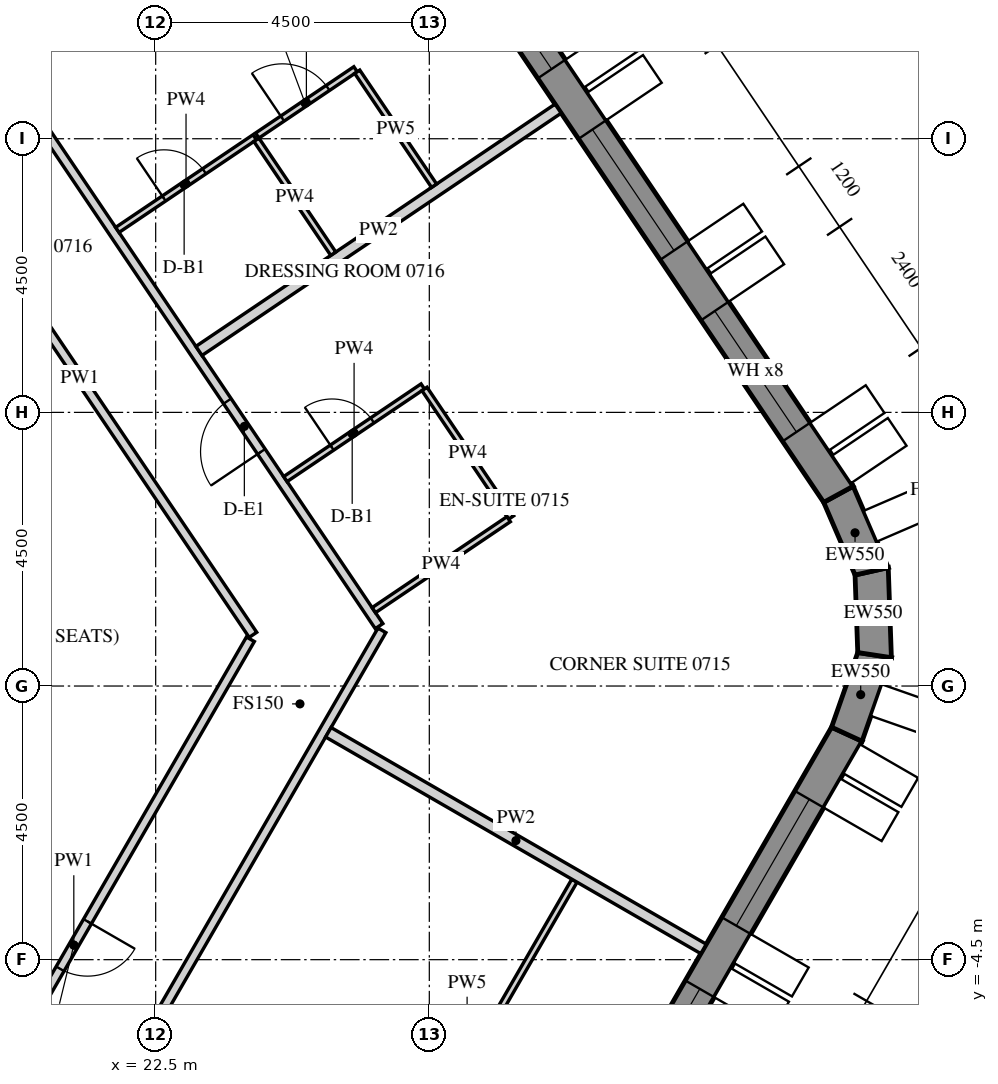
"""IFC4 building model, lengths in metres.
Left out: names, types, materials, properties, quantities, classifications, styles, units other than length and angle.
Written with IfcOpenShell. Run it as: python <this file> out.ifc"""

import sys

from ifc_helpers import new_model, si_unit, direction, frame, frame_2d, origin, place, context, subcontext, project, spatial, polyline, rectangle, outline, extrude, element, fill, save


model = new_model("IFC4")
c1 = context("Model", 3, precision=1e-05, world=origin(), true_north=direction((0.0, 1.0)))
c2 = subcontext(c1, "Body", "Model", "MODEL_VIEW")
j1 = project(units=[si_unit("LENGTHUNIT", "METRE"), si_unit("PLANEANGLEUNIT", "RADIAN")], contexts=[c1])
p1 = place(None, origin())
s1 = spatial("IfcSite", under=j1, at=p1, CompositionType="ELEMENT")
p2 = place(p1, origin())
s2 = spatial("IfcBuilding", under=s1, at=p2, CompositionType="ELEMENT")
p3 = place(p2, frame((0.0, 0.0, 99.9)))
s3 = spatial("IfcBuildingStorey", under=s2, at=p3, CompositionType="ELEMENT", Elevation=99.9)
p4 = place(p3, frame((18.83, -26.835, -0.15), z_axis=(0.0, 0.0, 1.0), x_axis=(0.500003800416, 0.866023209602, 0.0)))
e1 = element("IfcWall", 1, at=p4, inside=s3, PredefinedType="SOLIDWALL", context=c2, shape_type="SweptSolid", body=[
    extrude(outline(polyline([(-0.022, -0.275), (30.097, -0.275), (30.045, 0.275), (0.022, 0.275), (-0.022, -0.275)])), origin(), (0.0, 0.0, 1.0), 3.9),
])
p5 = place(p4, frame((1.236, 0.0, 1.05)))
e2 = element("IfcOpeningElement", 2, at=p5, cuts=e1, PredefinedType="OPENING", context=c2, shape_type="SweptSolid", body=[
    extrude(rectangle(XDim=2.4, YDim=2.4, at=frame_2d((1.2, 1.2))), frame((0.0, 0.285, 0.0), z_axis=(0.0, -1.0, 0.0), x_axis=(1.0, 0.0, 0.0)), (0.0, 0.0, 1.0), 0.57),
])
p6 = place(p4, frame((4.835, 0.0, 1.05)))
e3 = element("IfcOpeningElement", 3, at=p6, cuts=e1, PredefinedType="OPENING", context=c2, shape_type="SweptSolid", body=[
    extrude(rectangle(XDim=2.4, YDim=2.4, at=frame_2d((1.2, 1.2))), frame((0.0, 0.285, 0.0), z_axis=(0.0, -1.0, 0.0), x_axis=(1.0, 0.0, 0.0)), (0.0, 0.0, 1.0), 0.57),
])
p7 = place(p4, frame((8.436, 0.0, 1.05)))
e4 = element("IfcOpeningElement", 4, at=p7, cuts=e1, PredefinedType="OPENING", context=c2, shape_type="SweptSolid", body=[
    extrude(rectangle(XDim=2.4, YDim=2.4, at=frame_2d((1.2, 1.2))), frame((0.0, 0.285, 0.0), z_axis=(0.0, -1.0, 0.0), x_axis=(1.0, 0.0, 0.0)), (0.0, 0.0, 1.0), 0.57),
])
p8 = place(p4, frame((12.035, 0.0, 1.05)))
e5 = element("IfcOpeningElement", 5, at=p8, cuts=e1, PredefinedType="OPENING", context=c2, shape_type="SweptSolid", body=[
    extrude(rectangle(XDim=2.4, YDim=2.4, at=frame_2d((1.2, 1.2))), frame((0.0, 0.285, 0.0), z_axis=(0.0, -1.0, 0.0), x_axis=(1.0, 0.0, 0.0)), (0.0, 0.0, 1.0), 0.57),
])
p9 = place(p4, frame((15.635, 0.0, 1.05)))
e6 = element("IfcOpeningElement", 6, at=p9, cuts=e1, PredefinedType="OPENING", context=c2, shape_type="SweptSolid", body=[
    extrude(rectangle(XDim=2.4, YDim=2.4, at=frame_2d((1.2, 1.2))), frame((0.0, 0.285, 0.0), z_axis=(0.0, -1.0, 0.0), x_axis=(1.0, 0.0, 0.0)), (0.0, 0.0, 1.0), 0.57),
])
p10 = place(p4, frame((19.236, 0.0, 1.05)))
e7 = element("IfcOpeningElement", 7, at=p10, cuts=e1, PredefinedType="OPENING", context=c2, shape_type="SweptSolid", body=[
    extrude(rectangle(XDim=2.4, YDim=2.4, at=frame_2d((1.2, 1.2))), frame((0.0, 0.285, 0.0), z_axis=(0.0, -1.0, 0.0), x_axis=(1.0, 0.0, 0.0)), (0.0, 0.0, 1.0), 0.57),
])
p11 = place(p4, frame((22.835, 0.0, 1.05)))
e8 = element("IfcOpeningElement", 8, at=p11, cuts=e1, PredefinedType="OPENING", context=c2, shape_type="SweptSolid", body=[
    extrude(rectangle(XDim=2.4, YDim=2.4, at=frame_2d((1.2, 1.2))), frame((0.0, 0.285, 0.0), z_axis=(0.0, -1.0, 0.0), x_axis=(1.0, 0.0, 0.0)), (0.0, 0.0, 1.0), 0.57),
])
p12 = place(p4, frame((26.436, 0.0, 1.05)))
e9 = element("IfcOpeningElement", 9, at=p12, cuts=e1, PredefinedType="OPENING", context=c2, shape_type="SweptSolid", body=[
    extrude(rectangle(XDim=2.4, YDim=2.4, at=frame_2d((1.2, 1.2))), frame((0.0, 0.285, 0.0), z_axis=(0.0, -1.0, 0.0), x_axis=(1.0, 0.0, 0.0)), (0.0, 0.0, 1.0), 0.57),
])
p13 = place(p3, frame((33.866, -0.792, -0.15), z_axis=(0.0, 0.0, 1.0), x_axis=(0.33111537203, 0.943590276765, 0.0)))
e10 = element("IfcWall", 10, at=p13, inside=s3, PredefinedType="SOLIDWALL", context=c2, shape_type="SweptSolid", body=[
    extrude(outline(polyline([(-0.026, -0.275), (1.431, -0.275), (1.327, 0.275), (0.026, 0.275), (-0.026, -0.275)])), origin(), (0.0, 0.0, 1.0), 3.9),
])
p14 = place(p3, frame((34.323, 0.509, -0.15), z_axis=(0.0, 0.0, 1.0), x_axis=(-0.034876908462, 0.999391615562, 0.0)))
e11 = element("IfcWall", 11, at=p14, inside=s3, PredefinedType="SOLIDWALL", context=c2, shape_type="SweptSolid", body=[
    extrude(outline(polyline([(-0.052, -0.275), (1.431, -0.275), (1.327, 0.275), (0.052, 0.275), (-0.052, -0.275)])), origin(), (0.0, 0.0, 1.0), 3.9),
])
p15 = place(p3, frame((34.274, 1.887, -0.15), z_axis=(0.0, 0.0, 1.0), x_axis=(-0.396161342798, 0.918180913803, 0.0)))
e12 = element("IfcWall", 12, at=p15, inside=s3, PredefinedType="SOLIDWALL", context=c2, shape_type="SweptSolid", body=[
    extrude(outline(polyline([(-0.052, -0.275), (1.405, -0.275), (1.354, 0.275), (0.052, 0.275), (-0.052, -0.275)])), origin(), (0.0, 0.0, 1.0), 3.9),
])
p16 = place(p3, frame((33.728, 3.153, -0.15), z_axis=(0.0, 0.0, 1.0), x_axis=(-0.559192411416, 0.82903790445, 0.0)))
e13 = element("IfcWall", 13, at=p16, inside=s3, PredefinedType="SOLIDWALL", context=c2, shape_type="SweptSolid", body=[
    extrude(outline(polyline([(-0.026, -0.275), (30.093, -0.275), (30.048, 0.275), (0.026, 0.275), (-0.026, -0.275)])), origin(), (0.0, 0.0, 1.0), 3.9),
])
p17 = place(p16, frame((1.236, 0.0, 1.05)))
e14 = element("IfcOpeningElement", 14, at=p17, cuts=e13, PredefinedType="OPENING", context=c2, shape_type="SweptSolid", body=[
    extrude(rectangle(XDim=2.4, YDim=2.4, at=frame_2d((1.2, 1.2))), frame((0.0, 0.285, 0.0), z_axis=(0.0, -1.0, 0.0), x_axis=(1.0, 0.0, 0.0)), (0.0, 0.0, 1.0), 0.57),
])
p18 = place(p16, frame((4.835, 0.0, 1.05)))
e15 = element("IfcOpeningElement", 15, at=p18, cuts=e13, PredefinedType="OPENING", context=c2, shape_type="SweptSolid", body=[
    extrude(rectangle(XDim=2.4, YDim=2.4, at=frame_2d((1.2, 1.2))), frame((0.0, 0.285, 0.0), z_axis=(0.0, -1.0, 0.0), x_axis=(1.0, 0.0, 0.0)), (0.0, 0.0, 1.0), 0.57),
])
p19 = place(p16, frame((8.436, 0.0, 1.05)))
e16 = element("IfcOpeningElement", 16, at=p19, cuts=e13, PredefinedType="OPENING", context=c2, shape_type="SweptSolid", body=[
    extrude(rectangle(XDim=2.4, YDim=2.4, at=frame_2d((1.2, 1.2))), frame((0.0, 0.285, 0.0), z_axis=(0.0, -1.0, 0.0), x_axis=(1.0, 0.0, 0.0)), (0.0, 0.0, 1.0), 0.57),
])
p20 = place(p16, frame((12.035, 0.0, 1.05)))
e17 = element("IfcOpeningElement", 17, at=p20, cuts=e13, PredefinedType="OPENING", context=c2, shape_type="SweptSolid", body=[
    extrude(rectangle(XDim=2.4, YDim=2.4, at=frame_2d((1.2, 1.2))), frame((0.0, 0.285, 0.0), z_axis=(0.0, -1.0, 0.0), x_axis=(1.0, 0.0, 0.0)), (0.0, 0.0, 1.0), 0.57),
])
p21 = place(p16, frame((15.635, 0.0, 1.05)))
e18 = element("IfcOpeningElement", 18, at=p21, cuts=e13, PredefinedType="OPENING", context=c2, shape_type="SweptSolid", body=[
    extrude(rectangle(XDim=2.4, YDim=2.4, at=frame_2d((1.2, 1.2))), frame((0.0, 0.285, 0.0), z_axis=(0.0, -1.0, 0.0), x_axis=(1.0, 0.0, 0.0)), (0.0, 0.0, 1.0), 0.57),
])
p22 = place(p16, frame((19.236, 0.0, 1.05)))
e19 = element("IfcOpeningElement", 19, at=p22, cuts=e13, PredefinedType="OPENING", context=c2, shape_type="SweptSolid", body=[
    extrude(rectangle(XDim=2.4, YDim=2.4, at=frame_2d((1.2, 1.2))), frame((0.0, 0.285, 0.0), z_axis=(0.0, -1.0, 0.0), x_axis=(1.0, 0.0, 0.0)), (0.0, 0.0, 1.0), 0.57),
])
p23 = place(p16, frame((22.835, 0.0, 1.05)))
e20 = element("IfcOpeningElement", 20, at=p23, cuts=e13, PredefinedType="OPENING", context=c2, shape_type="SweptSolid", body=[
    extrude(rectangle(XDim=2.4, YDim=2.4, at=frame_2d((1.2, 1.2))), frame((0.0, 0.285, 0.0), z_axis=(0.0, -1.0, 0.0), x_axis=(1.0, 0.0, 0.0)), (0.0, 0.0, 1.0), 0.57),
])
p24 = place(p16, frame((26.436, 0.0, 1.05)))
e21 = element("IfcOpeningElement", 21, at=p24, cuts=e13, PredefinedType="OPENING", context=c2, shape_type="SweptSolid", body=[
    extrude(rectangle(XDim=2.4, YDim=2.4, at=frame_2d((1.2, 1.2))), frame((0.0, 0.285, 0.0), z_axis=(0.0, -1.0, 0.0), x_axis=(1.0, 0.0, 0.0)), (0.0, 0.0, 1.0), 0.57),
])
p25 = place(p3, frame((14.102, -20.075, 0.0), z_axis=(0.0, 0.0, 1.0), x_axis=(0.499996816197, 0.866027241946, 0.0)))
e22 = element("IfcWall", 22, at=p25, inside=s3, PredefinedType="PARTITIONING", context=c2, shape_type="SweptSolid", body=[
    extrude(rectangle(XDim=24.238, YDim=0.15, at=frame_2d((12.119, 0.0))), origin(), (0.0, 0.0, 1.0), 2.988),
])
p26 = place(p25, frame((4.729, 0.0, 0.0)))
e23 = element("IfcOpeningElement", 23, at=p26, cuts=e22, PredefinedType="OPENING", context=c2, shape_type="SweptSolid", body=[
    extrude(rectangle(XDim=1.0, YDim=2.1, at=frame_2d((0.5, 1.05))), frame((0.0, 0.085, 0.0), z_axis=(0.0, -1.0, 0.0), x_axis=(1.0, 0.0, 0.0)), (0.0, 0.0, 1.0), 0.17),
])
p27 = place(p25, frame((15.946, 0.0, 0.0)))
e24 = element("IfcOpeningElement", 24, at=p27, cuts=e22, PredefinedType="OPENING", context=c2, shape_type="SweptSolid", body=[
    extrude(rectangle(XDim=1.0, YDim=2.1, at=frame_2d((0.5, 1.05))), frame((0.0, 0.085, 0.0), z_axis=(0.0, -1.0, 0.0), x_axis=(1.0, 0.0, 0.0)), (0.0, 0.0, 1.0), 0.17),
])
p28 = place(p3, frame((26.174, 0.985, 0.0), z_axis=(0.0, 0.0, 1.0), x_axis=(-0.559192163771, 0.829038071488, 0.0)))
e25 = element("IfcWall", 25, at=p28, inside=s3, PredefinedType="PARTITIONING", context=c2, shape_type="SweptSolid", body=[
    extrude(rectangle(XDim=22.335, YDim=0.15, at=frame_2d((11.168, 0.0))), origin(), (0.0, 0.0, 1.0), 2.988),
])
p29 = place(p28, frame((3.463, 0.0, 0.0)))
e26 = element("IfcOpeningElement", 26, at=p29, cuts=e25, PredefinedType="OPENING", context=c2, shape_type="SweptSolid", body=[
    extrude(rectangle(XDim=1.0, YDim=2.1, at=frame_2d((0.5, 1.05))), frame((0.0, 0.085, 0.0), z_axis=(0.0, -1.0, 0.0), x_axis=(1.0, 0.0, 0.0)), (0.0, 0.0, 1.0), 0.17),
])
p30 = place(p28, frame((13.309, 0.0, 0.0)))
e27 = element("IfcOpeningElement", 27, at=p30, cuts=e25, PredefinedType="OPENING", context=c2, shape_type="SweptSolid", body=[
    extrude(rectangle(XDim=1.0, YDim=2.1, at=frame_2d((0.5, 1.05))), frame((0.0, 0.085, 0.0), z_axis=(0.0, -1.0, 0.0), x_axis=(1.0, 0.0, 0.0)), (0.0, 0.0, 1.0), 0.17),
])
p31 = place(p3, frame((18.4, 9.291, 0.0), z_axis=(0.0, 0.0, 1.0), x_axis=(0.559191829043, -0.829038297265, 0.0)))
e28 = element("IfcWall", 28, at=p31, inside=s3, PredefinedType="PARTITIONING", context=c2, shape_type="SweptSolid", body=[
    extrude(rectangle(XDim=10.192, YDim=0.15, at=frame_2d((5.096, 0.0))), origin(), (0.0, 0.0, 1.0), 2.988),
])
p32 = place(p3, frame((24.058, 0.769, 0.0), z_axis=(0.0, 0.0, 1.0), x_axis=(-0.499995346943, -0.866028090212, 0.0)))
e29 = element("IfcWall", 29, at=p32, inside=s3, PredefinedType="PARTITIONING", context=c2, shape_type="SweptSolid", body=[
    extrude(rectangle(XDim=11.616, YDim=0.15, at=frame_2d((5.808, 0.0))), origin(), (0.0, 0.0, 1.0), 2.988),
])
p33 = place(p32, frame((5.358, 0.0, 0.0)))
e30 = element("IfcOpeningElement", 30, at=p33, cuts=e29, PredefinedType="OPENING", context=c2, shape_type="SweptSolid", body=[
    extrude(rectangle(XDim=0.9, YDim=2.1, at=frame_2d((0.45, 1.05))), frame((0.0, 0.085, 0.0), z_axis=(0.0, -1.0, 0.0), x_axis=(1.0, 0.0, 0.0)), (0.0, 0.0, 1.0), 0.17),
])
p34 = place(p3, frame((25.856, -9.315, 0.0), z_axis=(0.0, 0.0, 1.0), x_axis=(0.500010820671, 0.866019156377, 0.0)))
e31 = element("IfcWall", 31, at=p34, inside=s3, PredefinedType="PARTITIONING", context=c2, shape_type="SweptSolid", body=[
    extrude(rectangle(XDim=7.06, YDim=0.1, at=frame_2d((3.53, 0.0))), origin(), (0.0, 0.0, 1.0), 2.988),
])
p35 = place(p34, frame((3.1, 0.0, 0.0)))
e32 = element("IfcOpeningElement", 32, at=p35, cuts=e31, PredefinedType="OPENING", context=c2, shape_type="SweptSolid", body=[
    extrude(rectangle(XDim=0.9, YDim=2.1, at=frame_2d((0.45, 1.05))), frame((0.0, 0.06, 0.0), z_axis=(0.0, -1.0, 0.0), x_axis=(1.0, 0.0, 0.0)), (0.0, 0.0, 1.0), 0.12),
])
p36 = place(p3, frame((31.51, -4.323, 0.0), z_axis=(0.0, 0.0, 1.0), x_axis=(-0.866009834831, 0.500026965249, 0.0)))
e33 = element("IfcWall", 33, at=p36, inside=s3, PredefinedType="PARTITIONING", context=c2, shape_type="SweptSolid", body=[
    extrude(rectangle(XDim=7.125, YDim=0.18, at=frame_2d((3.562, 0.0))), origin(), (0.0, 0.0, 1.0), 2.988),
])
p37 = place(p3, frame((24.633, 3.403, 0.0), z_axis=(0.0, 0.0, 1.0), x_axis=(0.829047014003, 0.559178905694, 0.0)))
e34 = element("IfcWall", 34, at=p37, inside=s3, PredefinedType="PARTITIONING", context=c2, shape_type="SweptSolid", body=[
    extrude(rectangle(XDim=2.725, YDim=0.1, at=frame_2d((1.362, 0.0))), origin(), (0.0, 0.0, 1.0), 2.988),
])
p38 = place(p37, frame((0.925, 0.0, 0.0)))
e35 = element("IfcOpeningElement", 35, at=p38, cuts=e34, PredefinedType="OPENING", context=c2, shape_type="SweptSolid", body=[
    extrude(rectangle(XDim=0.8, YDim=2.1, at=frame_2d((0.4, 1.05))), frame((0.0, 0.06, 0.0), z_axis=(0.0, -1.0, 0.0), x_axis=(1.0, 0.0, 0.0)), (0.0, 0.0, 1.0), 0.12),
])
p39 = place(p3, frame((26.92, 4.885, 0.0), z_axis=(0.0, 0.0, 1.0), x_axis=(0.559221247909, -0.829018453285, 0.0)))
e36 = element("IfcWall", 36, at=p39, inside=s3, PredefinedType="PARTITIONING", context=c2, shape_type="SweptSolid", body=[
    extrude(rectangle(XDim=2.55, YDim=0.1, at=frame_2d((1.275, 0.0))), origin(), (0.0, 0.0, 1.0), 2.988),
])
p40 = place(p3, frame((28.305, 2.744, 0.0), z_axis=(0.0, 0.0, 1.0), x_axis=(-0.82904753069, -0.559178139645, 0.0)))
e37 = element("IfcWall", 37, at=p40, inside=s3, PredefinedType="PARTITIONING", context=c2, shape_type="SweptSolid", body=[
    extrude(rectangle(XDim=2.675, YDim=0.1, at=frame_2d((1.337, 0.0))), origin(), (0.0, 0.0, 1.0), 2.988),
])
p41 = place(p3, frame((29.119, 9.495, 0.0), z_axis=(0.0, 0.0, 1.0), x_axis=(-0.829049225145, -0.559175627408, 0.0)))
e38 = element("IfcWall", 38, at=p41, inside=s3, PredefinedType="PARTITIONING", context=c2, shape_type="SweptSolid", body=[
    extrude(rectangle(XDim=7.125, YDim=0.18, at=frame_2d((3.562, 0.0))), origin(), (0.0, 0.0, 1.0), 2.988),
])
p42 = place(p3, frame((21.87, 7.5, 0.0), z_axis=(0.0, 0.0, 1.0), x_axis=(0.829005477618, 0.559240483226, 0.0)))
e39 = element("IfcWall", 39, at=p42, inside=s3, PredefinedType="PARTITIONING", context=c2, shape_type="SweptSolid", body=[
    extrude(rectangle(XDim=2.725, YDim=0.1, at=frame_2d((1.363, 0.0))), origin(), (0.0, 0.0, 1.0), 2.988),
])
p43 = place(p42, frame((0.925, 0.0, 0.0)))
e40 = element("IfcOpeningElement", 40, at=p43, cuts=e39, PredefinedType="OPENING", context=c2, shape_type="SweptSolid", body=[
    extrude(rectangle(XDim=0.8, YDim=2.1, at=frame_2d((0.4, 1.05))), frame((0.0, 0.06, 0.0), z_axis=(0.0, -1.0, 0.0), x_axis=(1.0, 0.0, 0.0)), (0.0, 0.0, 1.0), 0.12),
])
p44 = place(p3, frame((24.17, 9.052, 0.0), z_axis=(0.0, 0.0, 1.0), x_axis=(0.829014089772, 0.559227716552, 0.0)))
e41 = element("IfcWall", 41, at=p44, inside=s3, PredefinedType="PARTITIONING", context=c2, shape_type="SweptSolid", body=[
    extrude(rectangle(XDim=1.95, YDim=0.1, at=frame_2d((0.975, 0.0))), origin(), (0.0, 0.0, 1.0), 2.988),
])
p45 = place(p44, frame((0.5, 0.0, 0.0)))
e42 = element("IfcOpeningElement", 42, at=p45, cuts=e41, PredefinedType="OPENING", context=c2, shape_type="SweptSolid", body=[
    extrude(rectangle(XDim=0.9, YDim=2.1, at=frame_2d((0.45, 1.05))), frame((0.0, 0.06, 0.0), z_axis=(0.0, -1.0, 0.0), x_axis=(1.0, 0.0, 0.0)), (0.0, 0.0, 1.0), 0.12),
])
p46 = place(p3, frame((25.815, 10.101, 0.0), z_axis=(0.0, 0.0, 1.0), x_axis=(0.559253906445, -0.828996422264, 0.0)))
e43 = element("IfcWall", 43, at=p46, inside=s3, PredefinedType="PARTITIONING", context=c2, shape_type="SweptSolid", body=[
    extrude(rectangle(XDim=2.26, YDim=0.1, at=frame_2d((1.13, 0.0))), origin(), (0.0, 0.0, 1.0), 2.988),
])
p47 = place(p3, frame((25.42, 7.109, 0.0), z_axis=(0.0, 0.0, 1.0), x_axis=(-0.559179660023, 0.829046505219, 0.0)))
e44 = element("IfcWall", 44, at=p47, inside=s3, PredefinedType="PARTITIONING", context=c2, shape_type="SweptSolid", body=[
    extrude(rectangle(XDim=2.26, YDim=0.1, at=frame_2d((1.13, 0.0))), origin(), (0.0, 0.0, 1.0), 2.988),
])
p48 = place(p11, frame((0.0, 0.205, 0.0)))
e45 = element("IfcWindow", 45, at=p48, inside=s3, PartitioningType="DOUBLE_PANEL_VERTICAL", PredefinedType="WINDOW", context=c2, shape_type="SweptSolid", body=[
    extrude(rectangle(XDim=2.4, YDim=2.4, at=frame_2d((1.2, 1.2))), frame((0.0, 0.03, 0.0), z_axis=(0.0, -1.0, 0.0), x_axis=(1.0, 0.0, 0.0)), (0.0, 0.0, 1.0), 0.06),
])
fill(e8, e45)
p49 = place(p12, frame((0.0, 0.205, 0.0)))
e46 = element("IfcWindow", 46, at=p49, inside=s3, PartitioningType="DOUBLE_PANEL_VERTICAL", PredefinedType="WINDOW", context=c2, shape_type="SweptSolid", body=[
    extrude(rectangle(XDim=2.4, YDim=2.4, at=frame_2d((1.2, 1.2))), frame((0.0, 0.03, 0.0), z_axis=(0.0, -1.0, 0.0), x_axis=(1.0, 0.0, 0.0)), (0.0, 0.0, 1.0), 0.06),
])
fill(e9, e46)
p50 = place(p17, frame((0.0, 0.205, 0.0)))
e47 = element("IfcWindow", 47, at=p50, inside=s3, PartitioningType="DOUBLE_PANEL_VERTICAL", PredefinedType="WINDOW", context=c2, shape_type="SweptSolid", body=[
    extrude(rectangle(XDim=2.4, YDim=2.4, at=frame_2d((1.2, 1.2))), frame((0.0, 0.03, 0.0), z_axis=(0.0, -1.0, 0.0), x_axis=(1.0, 0.0, 0.0)), (0.0, 0.0, 1.0), 0.06),
])
fill(e14, e47)
p51 = place(p18, frame((0.0, 0.205, 0.0)))
e48 = element("IfcWindow", 48, at=p51, inside=s3, PartitioningType="DOUBLE_PANEL_VERTICAL", PredefinedType="WINDOW", context=c2, shape_type="SweptSolid", body=[
    extrude(rectangle(XDim=2.4, YDim=2.4, at=frame_2d((1.2, 1.2))), frame((0.0, 0.03, 0.0), z_axis=(0.0, -1.0, 0.0), x_axis=(1.0, 0.0, 0.0)), (0.0, 0.0, 1.0), 0.06),
])
fill(e15, e48)
p52 = place(p19, frame((0.0, 0.205, 0.0)))
e49 = element("IfcWindow", 49, at=p52, inside=s3, PartitioningType="DOUBLE_PANEL_VERTICAL", PredefinedType="WINDOW", context=c2, shape_type="SweptSolid", body=[
    extrude(rectangle(XDim=2.4, YDim=2.4, at=frame_2d((1.2, 1.2))), frame((0.0, 0.03, 0.0), z_axis=(0.0, -1.0, 0.0), x_axis=(1.0, 0.0, 0.0)), (0.0, 0.0, 1.0), 0.06),
])
fill(e16, e49)
p53 = place(p29, origin())
e50 = element("IfcDoor", 50, at=p53, inside=s3, OperationType="SINGLE_SWING_LEFT", PredefinedType="DOOR", context=c2, shape_type="SweptSolid", body=[
    extrude(rectangle(XDim=1.0, YDim=2.1, at=frame_2d((0.5, 1.05))), frame((0.0, 0.025, 0.0), z_axis=(0.0, -1.0, 0.0), x_axis=(1.0, 0.0, 0.0)), (0.0, 0.0, 1.0), 0.05),
])
fill(e26, e50)
p54 = place(p38, origin())
e51 = element("IfcDoor", 51, at=p54, inside=s3, OperationType="SINGLE_SWING_RIGHT", PredefinedType="DOOR", context=c2, shape_type="SweptSolid", body=[
    extrude(rectangle(XDim=0.8, YDim=2.1, at=frame_2d((0.4, 1.05))), frame((0.0, 0.025, 0.0), z_axis=(0.0, -1.0, 0.0), x_axis=(1.0, 0.0, 0.0)), (0.0, 0.0, 1.0), 0.05),
])
fill(e35, e51)
p55 = place(p43, origin())
e52 = element("IfcDoor", 52, at=p55, inside=s3, OperationType="SINGLE_SWING_RIGHT", PredefinedType="DOOR", context=c2, shape_type="SweptSolid", body=[
    extrude(rectangle(XDim=0.8, YDim=2.1, at=frame_2d((0.4, 1.05))), frame((0.0, 0.025, 0.0), z_axis=(0.0, -1.0, 0.0), x_axis=(1.0, 0.0, 0.0)), (0.0, 0.0, 1.0), 0.05),
])
fill(e40, e52)
p56 = place(p45, origin())
e53 = element("IfcDoor", 53, at=p56, inside=s3, OperationType="SINGLE_SWING_LEFT", PredefinedType="DOOR", context=c2, shape_type="SweptSolid", body=[
    extrude(rectangle(XDim=0.9, YDim=2.1, at=frame_2d((0.45, 1.05))), frame((0.0, 0.025, 0.0), z_axis=(0.0, -1.0, 0.0), x_axis=(1.0, 0.0, 0.0)), (0.0, 0.0, 1.0), 0.05),
])
fill(e42, e53)
p57 = place(p33, origin())
e54 = element("IfcDoor", 54, at=p57, inside=s3, OperationType="SINGLE_SWING_LEFT", PredefinedType="DOOR", context=c2, shape_type="SweptSolid", body=[
    extrude(rectangle(XDim=0.9, YDim=2.1, at=frame_2d((0.45, 1.05))), frame((0.0, 0.025, 0.0), z_axis=(0.0, -1.0, 0.0), x_axis=(1.0, 0.0, 0.0)), (0.0, 0.0, 1.0), 0.05),
])
fill(e30, e54)
save(model, sys.argv[1])
